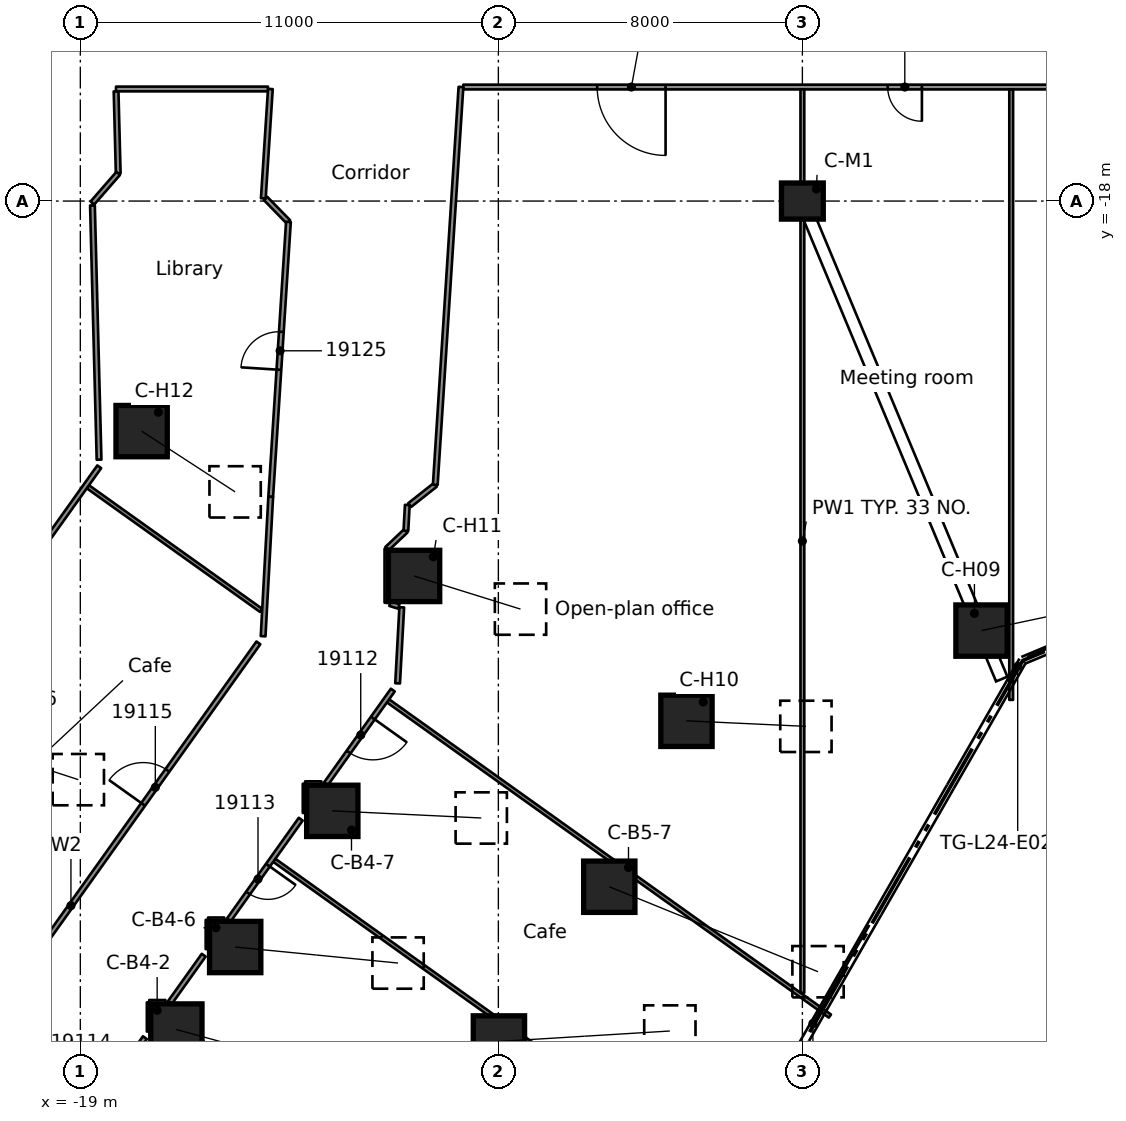
"""IFC4 building model, lengths in metres.
Left out: names, types, materials, properties, quantities, classifications, styles, units other than length and angle.
Written with IfcOpenShell. Run it as: python <this file> out.ifc"""

import sys

from ifc_helpers import new_model, si_unit, direction, frame, frame_2d, origin, origin_2d, place, context, subcontext, project, spatial, rectangle, extrude, element, fill, save


model = new_model("IFC4")
c1 = context("Model", 3, precision=1e-05, world=origin(), true_north=direction((0.0, 1.0)))
c2 = subcontext(c1, "Body", "Model", "MODEL_VIEW")
j1 = project(units=[si_unit("LENGTHUNIT", "METRE"), si_unit("PLANEANGLEUNIT", "RADIAN")], contexts=[c1])
p1 = place(None, origin())
s1 = spatial("IfcSite", under=j1, at=p1, CompositionType="ELEMENT")
p2 = place(p1, origin())
s2 = spatial("IfcBuilding", under=s1, at=p2, CompositionType="ELEMENT")
p3 = place(p2, frame((0.0, 0.0, 98.2)))
s3 = spatial("IfcBuildingStorey", under=s2, at=p3, CompositionType="ELEMENT", Elevation=98.2)
p4 = place(p3, frame((-22.822, -31.995, 0.544), z_axis=(0.76622208447, -0.249848553778, 0.592013021347), x_axis=(0.310013339183, 0.950732207053, 0.0)))
e1 = element("IfcColumn", 1, at=p4, inside=s3, PredefinedType="COLUMN", context=c2, shape_type="SweptSolid", body=[
    extrude(rectangle(XDim=1.35, YDim=1.35, at=origin_2d()), origin(), (0.0, 0.0, 1.0), 4.919),
])
p5 = place(p3, frame((-16.473, -39.799, 0.562), z_axis=(0.803489718201, -0.21971009191, 0.553291738831), x_axis=(0.263761556788, 0.964587912614, 0.0)))
e2 = element("IfcColumn", 2, at=p5, inside=s3, PredefinedType="COLUMN", context=c2, shape_type="SweptSolid", body=[
    extrude(rectangle(XDim=1.35, YDim=1.35, at=origin_2d()), origin(), (0.0, 0.0, 1.0), 5.197),
])
p6 = place(p3, frame((-14.925, -37.628, 0.561), z_axis=(0.827494463111, -0.081495666822, 0.555528009924), x_axis=(0.098010679686, 0.995185362969, 0.0)))
e3 = element("IfcColumn", 3, at=p6, inside=s3, PredefinedType="COLUMN", context=c2, shape_type="SweptSolid", body=[
    extrude(rectangle(XDim=1.35, YDim=1.35, at=origin_2d()), origin(), (0.0, 0.0, 1.0), 5.18),
])
p7 = place(p3, frame((-12.37, -34.045, 0.542), z_axis=(0.801721304484, -0.038445874351, 0.596460279216), x_axis=(0.047899120468, 0.998852178382, 0.0)))
e4 = element("IfcColumn", 4, at=p7, inside=s3, PredefinedType="COLUMN", context=c2, shape_type="SweptSolid", body=[
    extrude(rectangle(XDim=1.35, YDim=1.35, at=origin_2d()), origin(), (0.0, 0.0, 1.0), 4.89),
])
p8 = place(p3, frame((-7.985, -40.113, 0.57), z_axis=(0.8427337001, 0.05155019974, 0.53585677902), x_axis=(-0.061056089739, 0.998134336603, 0.0)))
e5 = element("IfcColumn", 5, at=p8, inside=s3, PredefinedType="COLUMN", context=c2, shape_type="SweptSolid", body=[
    extrude(rectangle(XDim=1.35, YDim=1.35, at=origin_2d()), origin(), (0.0, 0.0, 1.0), 5.337),
])
p9 = place(p3, frame((-5.081, -36.042, 0.611), z_axis=(0.838787270737, -0.341442338342, 0.424090844085), x_axis=(0.377026202112, 0.926202592806, 0.0)))
e6 = element("IfcColumn", 6, at=p9, inside=s3, PredefinedType="COLUMN", context=c2, shape_type="SweptSolid", body=[
    extrude(rectangle(XDim=1.35, YDim=1.35, at=origin_2d()), origin(), (0.0, 0.0, 1.0), 6.549),
])
p10 = place(p3, frame((4.714, -29.302, 0.467), z_axis=(0.676218305191, 0.14323977711, 0.722641799218), x_axis=(-0.207226666249, 0.97829295653, 0.0)))
e7 = element("IfcColumn", 7, at=p10, inside=s3, PredefinedType="COLUMN", context=c2, shape_type="SweptSolid", body=[
    extrude(rectangle(XDim=1.35, YDim=1.35, at=origin_2d()), origin(), (0.0, 0.0, 1.0), 4.244),
])
p11 = place(p3, frame((-3.05, -31.676, 0.486), z_axis=(0.719838795512, -0.03343666302, 0.693335487366), x_axis=(0.046400179673, 0.998922931625, 0.0)))
e8 = element("IfcColumn", 8, at=p11, inside=s3, PredefinedType="COLUMN", context=c2, shape_type="SweptSolid", body=[
    extrude(rectangle(XDim=1.35, YDim=1.35, at=origin_2d()), origin(), (0.0, 0.0, 1.0), 4.366),
])
for number, where, z_axis, x_axis in (
    (9, (-10.218, -27.864, 0.467), (0.66, -0.206, 0.723), (0.298, 0.955, 0.0)),
    (10, (-17.387, -24.053, 0.467), (0.58, -0.377, 0.723), (0.545, 0.838, 0.0)),
):
    element("IfcColumn", number, at=place(p3, frame(where, z_axis=z_axis, x_axis=x_axis)), inside=s3, PredefinedType="COLUMN", context=c2, shape_type="SweptSolid", body=[
        extrude(rectangle(XDim=1.35, YDim=1.35, at=origin_2d()), origin(), (0.0, 0.0, 1.0), 4.244),
    ])
p12 = place(p3, frame((0.0, -18.0, 0.0), z_axis=(0.0, 0.0, 1.0), x_axis=(1.0, 0.0, 0.0)))
e11 = element("IfcColumn", 11, at=p12, inside=s3, PredefinedType="COLUMN", context=c2, shape_type="SweptSolid", body=[
    extrude(rectangle(XDim=1.1, YDim=0.95, at=origin_2d()), origin(), (0.0, 0.0, 1.0), 4.0),
])
p13 = place(p3, frame((-18.681, -18.114, 0.0), z_axis=(0.0, 0.0, 1.0), x_axis=(0.025970949463, -0.999662698006, 0.0)))
e12 = element("IfcWall", 12, at=p13, inside=s3, PredefinedType="PARTITIONING", context=c2, shape_type="SweptSolid", body=[
    extrude(rectangle(XDim=6.693, YDim=0.125, at=frame_2d((3.347, 0.0))), origin(), (0.0, 0.0, 1.0), 3.58),
])
p14 = place(p3, frame((-18.059, -15.113, 0.0), z_axis=(0.0, 0.0, 1.0), x_axis=(0.026000479926, -0.999661930376, 0.0)))
e13 = element("IfcWall", 13, at=p14, inside=s3, PredefinedType="PARTITIONING", context=c2, shape_type="SweptSolid", body=[
    extrude(rectangle(XDim=2.16, YDim=0.125, at=frame_2d((1.08, 0.0))), origin(), (0.0, 0.0, 1.0), 3.58),
])
p15 = place(p3, frame((-17.095, -39.395, 0.0), z_axis=(0.0, 0.0, 1.0), x_axis=(0.814054615278, -0.580788329209, 0.0)))
e14 = element("IfcWall", 14, at=p15, inside=s3, PredefinedType="PARTITIONING", context=c2, shape_type="SweptSolid", body=[
    extrude(rectangle(XDim=15.558, YDim=0.1, at=frame_2d((7.779, 0.0))), origin(), (0.0, 0.0, 1.0), 3.58),
])
p16 = place(p3, frame((-13.896, -35.347, 0.0), z_axis=(0.0, 0.0, 1.0), x_axis=(0.814118018686, -0.580699450362, 0.0)))
e15 = element("IfcWall", 15, at=p16, inside=s3, PredefinedType="PARTITIONING", context=c2, shape_type="SweptSolid", body=[
    extrude(rectangle(XDim=14.793, YDim=0.1, at=frame_2d((7.396, 0.0))), origin(), (0.0, 0.0, 1.0), 3.58),
])
p17 = place(p3, frame((-18.801, -25.518, 0.0), z_axis=(0.0, 0.0, 1.0), x_axis=(0.814033792671, -0.580817513845, 0.0)))
e16 = element("IfcWall", 16, at=p17, inside=s3, PredefinedType="PARTITIONING", context=c2, shape_type="SweptSolid", body=[
    extrude(rectangle(XDim=5.601, YDim=0.1, at=frame_2d((2.8, 0.0))), origin(), (0.0, 0.0, 1.0), 3.58),
])
p18 = place(p3, frame((-10.903, -31.151, 0.0), z_axis=(0.0, 0.0, 1.0), x_axis=(0.814095980234, -0.580730346173, 0.0)))
e17 = element("IfcWall", 17, at=p18, inside=s3, PredefinedType="PARTITIONING", context=c2, shape_type="SweptSolid", body=[
    extrude(rectangle(XDim=14.282, YDim=0.1, at=frame_2d((7.141, 0.0))), origin(), (0.0, 0.0, 1.0), 3.58),
])
p19 = place(p3, frame((-10.851, -28.593, 0.0), z_axis=(0.0, 0.0, 1.0), x_axis=(0.953506468262, -0.301372551808, 0.0)))
e18 = element("IfcWall", 18, at=p19, inside=s3, PredefinedType="PARTITIONING", context=c2, shape_type="SweptSolid", body=[
    extrude(rectangle(XDim=0.242, YDim=0.125, at=frame_2d((0.121, 0.0))), origin(), (0.0, 0.0, 1.0), 3.58),
])
p20 = place(p3, frame((-10.334, -26.0, 0.0), z_axis=(0.0, 0.0, 1.0), x_axis=(0.784984641374, 0.619515224032, 0.0)))
e19 = element("IfcWall", 19, at=p20, inside=s3, PredefinedType="PARTITIONING", context=c2, shape_type="SweptSolid", body=[
    extrude(rectangle(XDim=0.859, YDim=0.125, at=frame_2d((0.429, 0.0))), origin(), (0.0, 0.0, 1.0), 3.58),
])
p21 = place(p3, frame((-14.123, -17.934, 0.0), z_axis=(0.0, 0.0, 1.0), x_axis=(0.698373637728, -0.715733373629, 0.0)))
e20 = element("IfcWall", 20, at=p21, inside=s3, PredefinedType="PARTITIONING", context=c2, shape_type="SweptSolid", body=[
    extrude(rectangle(XDim=0.858, YDim=0.125, at=frame_2d((0.429, 0.0))), origin(), (0.0, 0.0, 1.0), 3.58),
])
for number, where, z_axis, x_axis in (
    (21, (-17.187, -39.085, 0.0), (0.0, 0.0, 1.0), (1.0, 0.0, 0.0)),
    (22, (-15.639, -36.914, 0.0), (0.0, 0.0, 1.0), (1.0, 0.0, 0.0)),
):
    element("IfcWall", number, at=place(p3, frame(where, z_axis=z_axis, x_axis=x_axis)), inside=s3, PredefinedType="PARTITIONING", context=c2, shape_type="SweptSolid", body=[
        extrude(rectangle(XDim=0.427, YDim=0.125, at=frame_2d((0.213, 0.0))), origin(), (0.0, 0.0, 1.0), 3.58),
    ])
p22 = place(p3, frame((-13.084, -33.331, 0.0), z_axis=(0.0, 0.0, 1.0), x_axis=(1.0, 0.0, 0.0)))
e23 = element("IfcWall", 23, at=p22, inside=s3, PredefinedType="PARTITIONING", context=c2, shape_type="SweptSolid", body=[
    extrude(rectangle(XDim=0.428, YDim=0.125, at=frame_2d((0.214, 0.0))), origin(), (0.0, 0.0, 1.0), 3.58),
])
p23 = place(p3, frame((-10.932, -27.149, 0.0), z_axis=(0.0, 0.0, 1.0), x_axis=(0.72568194661, 0.68803031355, 0.0)))
e24 = element("IfcWall", 24, at=p23, inside=s3, PredefinedType="PARTITIONING", context=c2, shape_type="SweptSolid", body=[
    extrude(rectangle(XDim=0.687, YDim=0.125, at=frame_2d((0.344, 0.0))), origin(), (0.0, 0.0, 1.0), 3.58),
])
p24 = place(p3, frame((-18.061, -15.051, 0.0), z_axis=(0.0, 0.0, 1.0), x_axis=(1.0, 0.0, 0.0)))
e25 = element("IfcWall", 25, at=p24, inside=s3, PredefinedType="PARTITIONING", context=c2, shape_type="SweptSolid", body=[
    extrude(rectangle(XDim=3.999, YDim=0.125, at=frame_2d((2.0, 0.0))), origin(), (0.0, 0.0, 1.0), 3.58),
])
p25 = place(p3, frame((10.993, -15.0, 0.0), z_axis=(0.0, 0.0, 1.0), x_axis=(-1.0, 0.0, 0.0)))
e26 = element("IfcWall", 26, at=p25, inside=s3, PredefinedType="PARTITIONING", context=c2, shape_type="SweptSolid", body=[
    extrude(rectangle(XDim=19.915, YDim=0.125, at=frame_2d((9.958, 0.0))), origin(), (0.0, 0.0, 1.0), 3.58),
])
p26 = place(p25, frame((14.593, 0.0, 0.0)))
e27 = element("IfcOpeningElement", 27, at=p26, cuts=e26, PredefinedType="OPENING", context=c2, shape_type="SweptSolid", body=[
    extrude(rectangle(XDim=1.8, YDim=2.1, at=frame_2d((0.9, 1.05))), frame((0.0, 0.073, 0.0), z_axis=(0.0, -1.0, 0.0), x_axis=(1.0, 0.0, 0.0)), (0.0, 0.0, 1.0), 0.145),
])
p27 = place(p25, frame((7.848, 0.0, 0.0)))
e28 = element("IfcOpeningElement", 28, at=p27, cuts=e26, PredefinedType="OPENING", context=c2, shape_type="SweptSolid", body=[
    extrude(rectangle(XDim=0.9, YDim=2.1, at=frame_2d((0.45, 1.05))), frame((0.0, 0.073, 0.0), z_axis=(0.0, -1.0, 0.0), x_axis=(1.0, 0.0, 0.0)), (0.0, 0.0, 1.0), 0.145),
])
p28 = place(p25, frame((2.353, 0.0, 0.0)))
e29 = element("IfcOpeningElement", 29, at=p28, cuts=e26, PredefinedType="OPENING", context=c2, shape_type="SweptSolid", body=[
    extrude(rectangle(XDim=0.9, YDim=2.1, at=frame_2d((0.45, 1.05))), frame((0.0, 0.073, 0.0), z_axis=(0.0, -1.0, 0.0), x_axis=(1.0, 0.0, 0.0)), (0.0, 0.0, 1.0), 0.145),
])
p29 = place(p3, frame((-18.683, -18.052, 0.0), z_axis=(0.0, 0.0, 1.0), x_axis=(0.657217677818, 0.753700818603, 0.0)))
e30 = element("IfcWall", 30, at=p29, inside=s3, PredefinedType="PARTITIONING", context=c2, shape_type="SweptSolid", body=[
    extrude(rectangle(XDim=1.035, YDim=0.125, at=frame_2d((0.518, 0.0))), origin(), (0.0, 0.0, 1.0), 3.58),
])
p30 = place(p3, frame((-17.301, -40.013, 0.0), z_axis=(0.0, 0.0, 1.0), x_axis=(-0.58071861579, -0.814104347904, 0.0)))
e31 = element("IfcWall", 31, at=p30, inside=s3, PredefinedType="PARTITIONING", context=c2, shape_type="SweptSolid", body=[
    extrude(rectangle(XDim=7.825, YDim=0.125, at=frame_2d((3.912, 0.0))), origin(), (0.0, 0.0, 1.0), 3.58),
])
p31 = place(p30, frame((2.905, 0.0, 0.0)))
e32 = element("IfcOpeningElement", 32, at=p31, cuts=e31, PredefinedType="OPENING", context=c2, shape_type="SweptSolid", body=[
    extrude(rectangle(XDim=1.8, YDim=2.1, at=frame_2d((0.9, 1.05))), frame((0.0, 0.073, 0.0), z_axis=(0.0, -1.0, 0.0), x_axis=(1.0, 0.0, 0.0)), (0.0, 0.0, 1.0), 0.145),
])
p32 = place(p3, frame((-16.639, -39.084, 0.0), z_axis=(0.0, 0.0, 1.0), x_axis=(0.581056427343, 0.813863273679, 0.0)))
e33 = element("IfcWall", 33, at=p32, inside=s3, PredefinedType="PARTITIONING", context=c2, shape_type="SweptSolid", body=[
    extrude(rectangle(XDim=1.525, YDim=0.125, at=frame_2d((0.762, 0.0))), origin(), (0.0, 0.0, 1.0), 3.58),
])
p33 = place(p3, frame((-13.2, -34.264, 0.0), z_axis=(0.0, 0.0, 1.0), x_axis=(-0.580805225512, -0.814042560324, 0.0)))
e34 = element("IfcWall", 34, at=p33, inside=s3, PredefinedType="PARTITIONING", context=c2, shape_type="SweptSolid", body=[
    extrude(rectangle(XDim=3.254, YDim=0.125, at=frame_2d((1.627, 0.0))), origin(), (0.0, 0.0, 1.0), 3.58),
])
p34 = place(p33, frame((1.487, 0.0, 0.0)))
e35 = element("IfcOpeningElement", 35, at=p34, cuts=e34, PredefinedType="OPENING", context=c2, shape_type="SweptSolid", body=[
    extrude(rectangle(XDim=0.9, YDim=2.1, at=frame_2d((0.45, 1.05))), frame((0.0, 0.073, 0.0), z_axis=(0.0, -1.0, 0.0), x_axis=(1.0, 0.0, 0.0)), (0.0, 0.0, 1.0), 0.145),
])
p35 = place(p3, frame((-10.777, -30.867, 0.0), z_axis=(0.0, 0.0, 1.0), x_axis=(-0.580680826128, -0.81413130278, 0.0)))
e36 = element("IfcWall", 36, at=p35, inside=s3, PredefinedType="PARTITIONING", context=c2, shape_type="SweptSolid", body=[
    extrude(rectangle(XDim=3.025, YDim=0.125, at=frame_2d((1.513, 0.0))), origin(), (0.0, 0.0, 1.0), 3.58),
])
p36 = place(p35, frame((0.904, 0.0, 0.0)))
e37 = element("IfcOpeningElement", 37, at=p36, cuts=e36, PredefinedType="OPENING", context=c2, shape_type="SweptSolid", body=[
    extrude(rectangle(XDim=1.1, YDim=2.1, at=frame_2d((0.55, 1.05))), frame((0.0, 0.073, 0.0), z_axis=(0.0, -1.0, 0.0), x_axis=(1.0, 0.0, 0.0)), (0.0, 0.0, 1.0), 0.145),
])
p37 = place(p3, frame((-24.179, -43.454, 0.0), z_axis=(0.0, 0.0, 1.0), x_axis=(0.580695596551, 0.814120767544, 0.0)))
e38 = element("IfcWall", 38, at=p37, inside=s3, PredefinedType="PARTITIONING", context=c2, shape_type="SweptSolid", body=[
    extrude(rectangle(XDim=16.987, YDim=0.125, at=frame_2d((8.493, 0.0))), origin(), (0.0, 0.0, 1.0), 3.58),
])
p38 = place(p37, frame((11.767, 0.0, 0.0)))
e39 = element("IfcOpeningElement", 39, at=p38, cuts=e38, PredefinedType="OPENING", context=c2, shape_type="SweptSolid", body=[
    extrude(rectangle(XDim=1.1, YDim=2.1, at=frame_2d((0.55, 1.05))), frame((0.0, 0.073, 0.0), z_axis=(0.0, -1.0, 0.0), x_axis=(1.0, 0.0, 0.0)), (0.0, 0.0, 1.0), 0.145),
])
p39 = place(p37, frame((3.155, 0.0, 0.0)))
e40 = element("IfcOpeningElement", 40, at=p39, cuts=e38, PredefinedType="OPENING", context=c2, shape_type="SweptSolid", body=[
    extrude(rectangle(XDim=0.9, YDim=2.1, at=frame_2d((0.45, 1.05))), frame((0.0, 0.073, 0.0), z_axis=(0.0, -1.0, 0.0), x_axis=(1.0, 0.0, 0.0)), (0.0, 0.0, 1.0), 0.145),
])
p40 = place(p3, frame((-18.502, -24.992, 0.0), z_axis=(0.0, 0.0, 1.0), x_axis=(-0.580690883061, -0.814124129559, 0.0)))
e41 = element("IfcWall", 41, at=p40, inside=s3, PredefinedType="PARTITIONING", context=c2, shape_type="SweptSolid", body=[
    extrude(rectangle(XDim=7.724, YDim=0.125, at=frame_2d((3.862, 0.0))), origin(), (0.0, 0.0, 1.0), 3.58),
])
p41 = place(p3, frame((-9.66, -25.468, 0.0), z_axis=(0.0, 0.0, 1.0), x_axis=(0.064433857117, 0.997921979945, 0.0)))
e42 = element("IfcWall", 42, at=p41, inside=s3, PredefinedType="PARTITIONING", context=c2, shape_type="SweptSolid", body=[
    extrude(rectangle(XDim=10.492, YDim=0.125, at=frame_2d((5.246, 0.0))), origin(), (0.0, 0.0, 1.0), 3.58),
])
p42 = place(p3, frame((-13.99, -25.782, 0.0), z_axis=(0.0, 0.0, 1.0), x_axis=(0.0642946406, 0.99793095913, 0.0)))
e43 = element("IfcWall", 43, at=p42, inside=s3, PredefinedType="PARTITIONING", context=c2, shape_type="SweptSolid", body=[
    extrude(rectangle(XDim=7.249, YDim=0.125, at=frame_2d((3.625, 0.0))), origin(), (0.0, 0.0, 1.0), 3.58),
])
p43 = place(p42, frame((3.35, 0.0, 0.0)))
e44 = element("IfcOpeningElement", 44, at=p43, cuts=e43, PredefinedType="OPENING", context=c2, shape_type="SweptSolid", body=[
    extrude(rectangle(XDim=1.0, YDim=2.1, at=frame_2d((0.5, 1.05))), frame((0.0, 0.073, 0.0), z_axis=(0.0, -1.0, 0.0), x_axis=(1.0, 0.0, 0.0)), (0.0, 0.0, 1.0), 0.145),
])
p44 = place(p3, frame((-14.185, -17.93, 0.0), z_axis=(0.0, 0.0, 1.0), x_axis=(0.064485583676, 0.997918638717, 0.0)))
e45 = element("IfcWall", 45, at=p44, inside=s3, PredefinedType="PARTITIONING", context=c2, shape_type="SweptSolid", body=[
    extrude(rectangle(XDim=2.885, YDim=0.125, at=frame_2d((1.442, 0.0))), origin(), (0.0, 0.0, 1.0), 3.58),
])
p45 = place(p3, frame((-10.651, -30.69, 0.0), z_axis=(0.0, 0.0, 1.0), x_axis=(0.054362851086, 0.998521246855, 0.0)))
e46 = element("IfcWall", 46, at=p45, inside=s3, PredefinedType="PARTITIONING", context=c2, shape_type="SweptSolid", body=[
    extrude(rectangle(XDim=2.003, YDim=0.125, at=frame_2d((1.001, 0.0))), origin(), (0.0, 0.0, 1.0), 3.58),
])
p46 = place(p3, frame((-10.433, -26.676, 0.0), z_axis=(0.0, 0.0, 1.0), x_axis=(0.054496990339, 0.998513934827, 0.0)))
e47 = element("IfcWall", 47, at=p46, inside=s3, PredefinedType="PARTITIONING", context=c2, shape_type="SweptSolid", body=[
    extrude(rectangle(XDim=0.681, YDim=0.125, at=frame_2d((0.34, 0.0))), origin(), (0.0, 0.0, 1.0), 3.58),
])
p47 = place(p3, frame((-14.19, -29.45, 0.0), z_axis=(0.0, 0.0, 1.0), x_axis=(0.054431963362, 0.998517481752, 0.0)))
e48 = element("IfcWall", 48, at=p47, inside=s3, PredefinedType="PARTITIONING", context=c2, shape_type="SweptSolid", body=[
    extrude(rectangle(XDim=3.673, YDim=0.125, at=frame_2d((1.837, 0.0))), origin(), (0.0, 0.0, 1.0), 3.58),
])
p48 = place(p3, frame((5.494, -31.126, 0.0), z_axis=(0.0, 0.0, 1.0), x_axis=(7.5990151e-05, 0.999999997113, 0.0)))
e49 = element("IfcWall", 49, at=p48, inside=s3, PredefinedType="PARTITIONING", context=c2, shape_type="SweptSolid", body=[
    extrude(rectangle(XDim=16.064, YDim=0.1, at=frame_2d((8.032, 0.0))), origin(), (0.0, 0.0, 1.0), 3.58),
])
p49 = place(p3, frame((0.0, -38.832, 0.0), z_axis=(0.0, 0.0, 1.0), x_axis=(0.0, 1.0, 0.0)))
e50 = element("IfcWall", 50, at=p49, inside=s3, PredefinedType="PARTITIONING", context=c2, shape_type="SweptSolid", body=[
    extrude(rectangle(XDim=23.77, YDim=0.1, at=frame_2d((11.885, 0.0))), origin(), (0.0, 0.0, 1.0), 3.58),
])
p50 = place(p3, frame((-10.932, -28.568, 0.0), z_axis=(0.0, 0.0, 1.0), x_axis=(0.0, 1.0, 0.0)))
e51 = element("IfcWall", 51, at=p50, inside=s3, PredefinedType="PARTITIONING", context=c2, shape_type="SweptSolid", body=[
    extrude(rectangle(XDim=1.419, YDim=0.125, at=frame_2d((0.709, 0.0))), origin(), (0.0, 0.0, 1.0), 3.58),
])
p51 = place(p3, frame((-13.084, -34.101, 0.0), z_axis=(0.0, 0.0, 1.0), x_axis=(0.0, 1.0, 0.0)))
e52 = element("IfcWall", 52, at=p51, inside=s3, PredefinedType="PARTITIONING", context=c2, shape_type="SweptSolid", body=[
    extrude(rectangle(XDim=0.77, YDim=0.125, at=frame_2d((0.385, 0.0))), origin(), (0.0, 0.0, 1.0), 3.58),
])
p52 = place(p3, frame((-15.639, -37.683, 0.0), z_axis=(0.0, 0.0, 1.0), x_axis=(0.0, 1.0, 0.0)))
e53 = element("IfcWall", 53, at=p52, inside=s3, PredefinedType="PARTITIONING", context=c2, shape_type="SweptSolid", body=[
    extrude(rectangle(XDim=0.769, YDim=0.125, at=frame_2d((0.385, 0.0))), origin(), (0.0, 0.0, 1.0), 3.58),
])
p53 = place(p3, frame((-17.187, -39.853, 0.0), z_axis=(0.0, 0.0, 1.0), x_axis=(0.0, 1.0, 0.0)))
e54 = element("IfcWall", 54, at=p53, inside=s3, PredefinedType="PARTITIONING", context=c2, shape_type="SweptSolid", body=[
    extrude(rectangle(XDim=0.768, YDim=0.125, at=frame_2d((0.384, 0.0))), origin(), (0.0, 0.0, 1.0), 3.58),
])
p54 = place(p36, origin())
e55 = element("IfcDoor", 55, at=p54, inside=s3, OperationType="SINGLE_SWING_LEFT", PredefinedType="DOOR", context=c2, shape_type="SweptSolid", body=[
    extrude(rectangle(XDim=1.1, YDim=2.1, at=frame_2d((0.55, 1.05))), frame((0.0, 0.025, 0.0), z_axis=(0.0, -1.0, 0.0), x_axis=(1.0, 0.0, 0.0)), (0.0, 0.0, 1.0), 0.05),
])
fill(e37, e55)
p55 = place(p34, origin())
e56 = element("IfcDoor", 56, at=p55, inside=s3, OperationType="SINGLE_SWING_RIGHT", PredefinedType="DOOR", context=c2, shape_type="SweptSolid", body=[
    extrude(rectangle(XDim=0.9, YDim=2.1, at=frame_2d((0.45, 1.05))), frame((0.0, 0.025, 0.0), z_axis=(0.0, -1.0, 0.0), x_axis=(1.0, 0.0, 0.0)), (0.0, 0.0, 1.0), 0.05),
])
fill(e35, e56)
p56 = place(p38, origin())
e57 = element("IfcDoor", 57, at=p56, inside=s3, OperationType="SINGLE_SWING_RIGHT", PredefinedType="DOOR", context=c2, shape_type="SweptSolid", body=[
    extrude(rectangle(XDim=1.1, YDim=2.1, at=frame_2d((0.55, 1.05))), frame((0.0, 0.025, 0.0), z_axis=(0.0, -1.0, 0.0), x_axis=(1.0, 0.0, 0.0)), (0.0, 0.0, 1.0), 0.05),
])
fill(e39, e57)
p57 = place(p43, origin())
e58 = element("IfcDoor", 58, at=p57, inside=s3, OperationType="SINGLE_SWING_RIGHT", PredefinedType="DOOR", context=c2, shape_type="SweptSolid", body=[
    extrude(rectangle(XDim=1.0, YDim=2.1, at=frame_2d((0.5, 1.05))), frame((0.0, 0.025, 0.0), z_axis=(0.0, -1.0, 0.0), x_axis=(1.0, 0.0, 0.0)), (0.0, 0.0, 1.0), 0.05),
])
fill(e44, e58)
p58 = place(p26, origin())
e59 = element("IfcDoor", 59, at=p58, inside=s3, OperationType="DOUBLE_DOOR_SINGLE_SWING", PredefinedType="DOOR", context=c2, shape_type="SweptSolid", body=[
    extrude(rectangle(XDim=1.8, YDim=2.1, at=frame_2d((0.9, 1.05))), frame((0.0, 0.025, 0.0), z_axis=(0.0, -1.0, 0.0), x_axis=(1.0, 0.0, 0.0)), (0.0, 0.0, 1.0), 0.05),
])
fill(e27, e59)
p59 = place(p27, origin())
e60 = element("IfcDoor", 60, at=p59, inside=s3, OperationType="SINGLE_SWING_LEFT", PredefinedType="DOOR", context=c2, shape_type="SweptSolid", body=[
    extrude(rectangle(XDim=0.9, YDim=2.1, at=frame_2d((0.45, 1.05))), frame((0.0, 0.025, 0.0), z_axis=(0.0, -1.0, 0.0), x_axis=(1.0, 0.0, 0.0)), (0.0, 0.0, 1.0), 0.05),
])
fill(e28, e60)
save(model, sys.argv[1])
